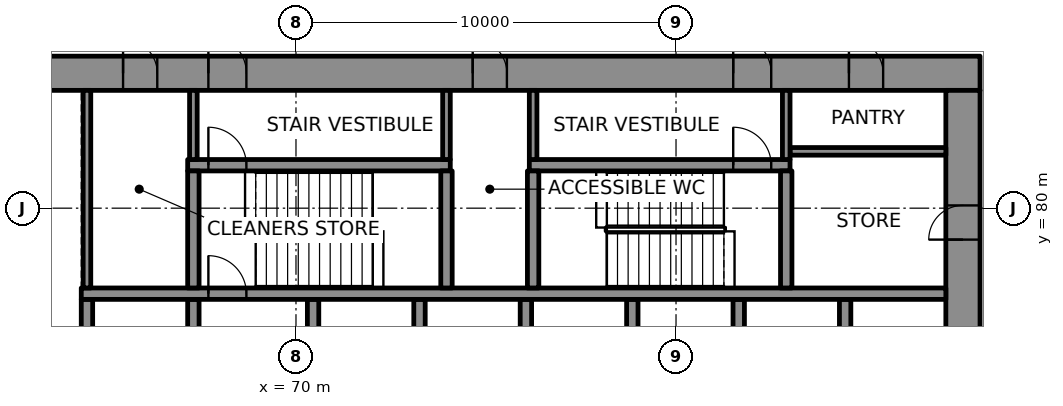
"""IFC4 building model, lengths in metres.
Left out: names, types, materials, properties, quantities, classifications, styles, units other than length and angle.
Written with IfcOpenShell. Run it as: python <this file> out.ifc"""

import sys

from ifc_helpers import new_model, si_unit, direction, frame, frame_2d, origin, place, context, subcontext, project, spatial, rectangle, extrude, element, fill, save


model = new_model("IFC4")
c1 = context("Model", 3, precision=1e-05, world=origin(), true_north=direction((0.0, 1.0)))
c2 = subcontext(c1, "Body", "Model", "MODEL_VIEW")
j1 = project(units=[si_unit("LENGTHUNIT", "METRE"), si_unit("PLANEANGLEUNIT", "RADIAN")], contexts=[c1])
p1 = place(None, origin())
s1 = spatial("IfcSite", under=j1, at=p1, CompositionType="ELEMENT")
p2 = place(p1, origin())
s2 = spatial("IfcBuilding", under=s1, at=p2, CompositionType="ELEMENT")
p3 = place(p2, frame((0.0, 0.0, 56.8)))
s3 = spatial("IfcBuildingStorey", under=s2, at=p3, CompositionType="ELEMENT", Elevation=56.8)
p4 = place(p3, frame((62.0, 83.55, 0.0), z_axis=(0.0, 0.0, 1.0), x_axis=(1.0, 0.0, 0.0)))
e1 = element("IfcWall", 1, at=p4, inside=s3, PredefinedType="SHEAR", context=c2, shape_type="SweptSolid", body=[
    extrude(rectangle(XDim=26.0, YDim=0.9, at=frame_2d((13.0, 0.0))), origin(), (0.0, 0.0, 1.0), 4.0),
])
p5 = place(p4, frame((5.695, 0.0, 0.0)))
e2 = element("IfcOpeningElement", 2, at=p5, cuts=e1, PredefinedType="OPENING", context=c2, shape_type="SweptSolid", body=[
    extrude(rectangle(XDim=1.0, YDim=2.1, at=frame_2d((0.5, 1.05))), frame((0.0, 0.46, 0.0), z_axis=(0.0, -1.0, 0.0), x_axis=(1.0, 0.0, 0.0)), (0.0, 0.0, 1.0), 0.92),
])
p6 = place(p4, frame((19.505, 0.0, 0.0)))
e3 = element("IfcOpeningElement", 3, at=p6, cuts=e1, PredefinedType="OPENING", context=c2, shape_type="SweptSolid", body=[
    extrude(rectangle(XDim=1.0, YDim=2.1, at=frame_2d((0.5, 1.05))), frame((0.0, 0.46, 0.0), z_axis=(0.0, -1.0, 0.0), x_axis=(1.0, 0.0, 0.0)), (0.0, 0.0, 1.0), 0.92),
])
p7 = place(p4, frame((3.45, 0.0, 0.0)))
e4 = element("IfcOpeningElement", 4, at=p7, cuts=e1, PredefinedType="OPENING", context=c2, shape_type="SweptSolid", body=[
    extrude(rectangle(XDim=0.9, YDim=2.1, at=frame_2d((0.45, 1.05))), frame((0.0, 0.46, 0.0), z_axis=(0.0, -1.0, 0.0), x_axis=(1.0, 0.0, 0.0)), (0.0, 0.0, 1.0), 0.92),
])
p8 = place(p4, frame((12.65, 0.0, 0.0)))
e5 = element("IfcOpeningElement", 5, at=p8, cuts=e1, PredefinedType="OPENING", context=c2, shape_type="SweptSolid", body=[
    extrude(rectangle(XDim=0.9, YDim=2.1, at=frame_2d((0.45, 1.05))), frame((0.0, 0.46, 0.0), z_axis=(0.0, -1.0, 0.0), x_axis=(1.0, 0.0, 0.0)), (0.0, 0.0, 1.0), 0.92),
])
p9 = place(p4, frame((22.55, 0.0, 0.0)))
e6 = element("IfcOpeningElement", 6, at=p9, cuts=e1, PredefinedType="OPENING", context=c2, shape_type="SweptSolid", body=[
    extrude(rectangle(XDim=0.9, YDim=2.1, at=frame_2d((0.45, 1.05))), frame((0.0, 0.46, 0.0), z_axis=(0.0, -1.0, 0.0), x_axis=(1.0, 0.0, 0.0)), (0.0, 0.0, 1.0), 0.92),
])
p10 = place(p3, frame((87.55, 66.9, 0.0), z_axis=(0.0, 0.0, 1.0), x_axis=(0.0, 1.0, 0.0)))
e7 = element("IfcWall", 7, at=p10, inside=s3, PredefinedType="SHEAR", context=c2, shape_type="SweptSolid", body=[
    extrude(rectangle(XDim=16.2, YDim=0.9, at=frame_2d((8.1, 0.0))), origin(), (0.0, 0.0, 1.0), 4.0),
])
p11 = place(p10, frame((5.5, 0.0, 0.0)))
e8 = element("IfcOpeningElement", 8, at=p11, cuts=e7, PredefinedType="OPENING", context=c2, shape_type="SweptSolid", body=[
    extrude(rectangle(XDim=1.8, YDim=2.1, at=frame_2d((0.9, 1.05))), frame((0.0, 0.46, 0.0), z_axis=(0.0, -1.0, 0.0), x_axis=(1.0, 0.0, 0.0)), (0.0, 0.0, 1.0), 0.92),
])
p12 = place(p10, frame((12.272, 0.0, 0.0)))
e9 = element("IfcOpeningElement", 9, at=p12, cuts=e7, PredefinedType="OPENING", context=c2, shape_type="SweptSolid", body=[
    extrude(rectangle(XDim=0.9, YDim=2.1, at=frame_2d((0.45, 1.05))), frame((0.0, 0.46, 0.0), z_axis=(0.0, -1.0, 0.0), x_axis=(1.0, 0.0, 0.0)), (0.0, 0.0, 1.0), 0.92),
])
for number, where, z_axis, x_axis in (
    (10, (64.5, 75.0, 0.0), (0.0, 0.0, 1.0), (0.0, 1.0, 0.0)),
    (11, (67.3, 75.0, 0.0), (0.0, 0.0, 1.0), (0.0, 1.0, 0.0)),
):
    element("IfcWall", number, at=place(p3, frame(where, z_axis=z_axis, x_axis=x_axis)), inside=s3, PredefinedType="SHEAR", context=c2, shape_type="SweptSolid", body=[
        extrude(rectangle(XDim=2.6, YDim=0.3, at=frame_2d((1.3, 0.0))), origin(), (0.0, 0.0, 1.0), 4.0),
    ])
p13 = place(p3, frame((70.45, 75.0, 0.0), z_axis=(0.0, 0.0, 1.0), x_axis=(0.0, 1.0, 0.0)))
e12 = element("IfcWall", 12, at=p13, inside=s3, PredefinedType="SHEAR", context=c2, shape_type="SweptSolid", body=[
    extrude(rectangle(XDim=2.6, YDim=0.3, at=frame_2d((1.3, 0.0))), origin(), (0.0, 0.0, 1.0), 4.0),
])
p14 = place(p13, frame((0.15, 0.0, 0.0)))
e13 = element("IfcOpeningElement", 13, at=p14, cuts=e12, PredefinedType="OPENING", context=c2, shape_type="SweptSolid", body=[
    extrude(rectangle(XDim=1.1, YDim=2.1, at=frame_2d((0.55, 1.05))), frame((0.0, 0.16, 0.0), z_axis=(0.0, -1.0, 0.0), x_axis=(1.0, 0.0, 0.0)), (0.0, 0.0, 1.0), 0.32),
])
for number, where, z_axis, x_axis in (
    (14, (73.25, 75.0, 0.0), (0.0, 0.0, 1.0), (0.0, 1.0, 0.0)),
    (15, (76.05, 75.0, 0.0), (0.0, 0.0, 1.0), (0.0, 1.0, 0.0)),
    (16, (78.85, 75.0, 0.0), (0.0, 0.0, 1.0), (0.0, 1.0, 0.0)),
    (17, (81.65, 75.0, 0.0), (0.0, 0.0, 1.0), (0.0, 1.0, 0.0)),
    (18, (84.45, 75.0, 0.0), (0.0, 0.0, 1.0), (0.0, 1.0, 0.0)),
):
    element("IfcWall", number, at=place(p3, frame(where, z_axis=z_axis, x_axis=x_axis)), inside=s3, PredefinedType="SHEAR", context=c2, shape_type="SweptSolid", body=[
        extrude(rectangle(XDim=2.6, YDim=0.3, at=frame_2d((1.3, 0.0))), origin(), (0.0, 0.0, 1.0), 4.0),
    ])
p15 = place(p3, frame((64.35, 77.75, 0.0), z_axis=(0.0, 0.0, 1.0), x_axis=(1.0, 0.0, 0.0)))
e19 = element("IfcWall", 19, at=p15, inside=s3, PredefinedType="SHEAR", context=c2, shape_type="SweptSolid", body=[
    extrude(rectangle(XDim=22.75, YDim=0.3, at=frame_2d((11.375, 0.0))), origin(), (0.0, 0.0, 1.0), 4.0),
])
p16 = place(p15, frame((3.345, 0.0, 0.0)))
e20 = element("IfcOpeningElement", 20, at=p16, cuts=e19, PredefinedType="OPENING", context=c2, shape_type="SweptSolid", body=[
    extrude(rectangle(XDim=1.0, YDim=2.1, at=frame_2d((0.5, 1.05))), frame((0.0, 0.16, 0.0), z_axis=(0.0, -1.0, 0.0), x_axis=(1.0, 0.0, 0.0)), (0.0, 0.0, 1.0), 0.32),
])
p17 = place(p3, frame((67.15, 81.13, 0.0), z_axis=(0.0, 0.0, 1.0), x_axis=(1.0, 0.0, 0.0)))
e21 = element("IfcWall", 21, at=p17, inside=s3, PredefinedType="SHEAR", context=c2, shape_type="SweptSolid", body=[
    extrude(rectangle(XDim=6.91, YDim=0.3, at=frame_2d((3.455, 0.0))), origin(), (0.0, 0.0, 1.0), 4.0),
])
p18 = place(p17, frame((0.545, 0.0, 0.0)))
e22 = element("IfcOpeningElement", 22, at=p18, cuts=e21, PredefinedType="OPENING", context=c2, shape_type="SweptSolid", body=[
    extrude(rectangle(XDim=1.0, YDim=2.1, at=frame_2d((0.5, 1.05))), frame((0.0, 0.16, 0.0), z_axis=(0.0, -1.0, 0.0), x_axis=(1.0, 0.0, 0.0)), (0.0, 0.0, 1.0), 0.32),
])
p19 = place(p3, frame((76.14, 81.13, 0.0), z_axis=(0.0, 0.0, 1.0), x_axis=(1.0, 0.0, 0.0)))
e23 = element("IfcWall", 23, at=p19, inside=s3, PredefinedType="SHEAR", context=c2, shape_type="SweptSolid", body=[
    extrude(rectangle(XDim=6.86, YDim=0.3, at=frame_2d((3.43, 0.0))), origin(), (0.0, 0.0, 1.0), 4.0),
])
p20 = place(p19, frame((5.365, 0.0, 0.0)))
e24 = element("IfcOpeningElement", 24, at=p20, cuts=e23, PredefinedType="OPENING", context=c2, shape_type="SweptSolid", body=[
    extrude(rectangle(XDim=1.0, YDim=2.1, at=frame_2d((0.5, 1.05))), frame((0.0, 0.16, 0.0), z_axis=(0.0, -1.0, 0.0), x_axis=(1.0, 0.0, 0.0)), (0.0, 0.0, 1.0), 0.32),
])
for number, where, z_axis, x_axis in (
    (25, (67.3, 77.9, 0.0), (0.0, 0.0, 1.0), (0.0, 1.0, 0.0)),
    (26, (73.96, 77.9, 0.0), (0.0, 0.0, 1.0), (0.0, 1.0, 0.0)),
    (27, (76.24, 77.9, 0.0), (0.0, 0.0, 1.0), (0.0, 1.0, 0.0)),
    (28, (82.9, 77.9, 0.0), (0.0, 0.0, 1.0), (0.0, 1.0, 0.0)),
):
    element("IfcWall", number, at=place(p3, frame(where, z_axis=z_axis, x_axis=x_axis)), inside=s3, PredefinedType="SHEAR", context=c2, shape_type="SweptSolid", body=[
        extrude(rectangle(XDim=3.08, YDim=0.3, at=frame_2d((1.54, 0.0))), origin(), (0.0, 0.0, 1.0), 4.0),
    ])
p21 = place(p3, frame((83.0, 81.495, 0.0), z_axis=(0.0, 0.0, 1.0), x_axis=(1.0, 0.0, 0.0)))
e29 = element("IfcWall", 29, at=p21, inside=s3, PredefinedType="PARTITIONING", context=c2, shape_type="SweptSolid", body=[
    extrude(rectangle(XDim=4.1, YDim=0.2, at=frame_2d((2.05, 0.0))), origin(), (0.0, 0.0, 1.0), 4.0),
])
p22 = place(p3, frame((64.5, 77.9, 0.0), z_axis=(0.0, 0.0, 1.0), x_axis=(0.0, 1.0, 0.0)))
e30 = element("IfcWall", 30, at=p22, inside=s3, PredefinedType="PARTITIONING", context=c2, shape_type="SweptSolid", body=[
    extrude(rectangle(XDim=5.2, YDim=0.2, at=frame_2d((2.6, 0.0))), origin(), (0.0, 0.0, 1.0), 4.0),
])
for number, where, z_axis, x_axis in (
    (31, (67.3, 81.28, 0.0), (0.0, 0.0, 1.0), (0.0, 1.0, 0.0)),
    (32, (73.96, 81.28, 0.0), (0.0, 0.0, 1.0), (0.0, 1.0, 0.0)),
    (33, (76.24, 81.28, 0.0), (0.0, 0.0, 1.0), (0.0, 1.0, 0.0)),
    (34, (82.9, 81.28, 0.0), (0.0, 0.0, 1.0), (0.0, 1.0, 0.0)),
):
    element("IfcWall", number, at=place(p3, frame(where, z_axis=z_axis, x_axis=x_axis)), inside=s3, PredefinedType="PARTITIONING", context=c2, shape_type="SweptSolid", body=[
        extrude(rectangle(XDim=1.82, YDim=0.2, at=frame_2d((0.91, 0.0))), origin(), (0.0, 0.0, 1.0), 4.0),
    ])
p23 = place(p16, origin())
e35 = element("IfcDoor", 35, at=p23, inside=s3, OperationType="SINGLE_SWING_LEFT", PredefinedType="DOOR", context=c2, shape_type="SweptSolid", body=[
    extrude(rectangle(XDim=1.0, YDim=2.1, at=frame_2d((0.5, 1.05))), frame((0.0, 0.025, 0.0), z_axis=(0.0, -1.0, 0.0), x_axis=(1.0, 0.0, 0.0)), (0.0, 0.0, 1.0), 0.05),
])
fill(e20, e35)
p24 = place(p18, origin())
e36 = element("IfcDoor", 36, at=p24, inside=s3, OperationType="SINGLE_SWING_RIGHT", PredefinedType="DOOR", context=c2, shape_type="SweptSolid", body=[
    extrude(rectangle(XDim=1.0, YDim=2.1, at=frame_2d((0.5, 1.05))), frame((0.0, 0.025, 0.0), z_axis=(0.0, -1.0, 0.0), x_axis=(1.0, 0.0, 0.0)), (0.0, 0.0, 1.0), 0.05),
])
fill(e22, e36)
p25 = place(p5, origin())
e37 = element("IfcDoor", 37, at=p25, inside=s3, OperationType="SINGLE_SWING_LEFT", PredefinedType="DOOR", context=c2, shape_type="SweptSolid", body=[
    extrude(rectangle(XDim=1.0, YDim=2.1, at=frame_2d((0.5, 1.05))), frame((0.0, 0.17, 0.0), z_axis=(0.0, -1.0, 0.0), x_axis=(1.0, 0.0, 0.0)), (0.0, 0.0, 1.0), 0.34),
])
fill(e2, e37)
p26 = place(p20, origin())
e38 = element("IfcDoor", 38, at=p26, inside=s3, OperationType="SINGLE_SWING_RIGHT", PredefinedType="DOOR", context=c2, shape_type="SweptSolid", body=[
    extrude(rectangle(XDim=1.0, YDim=2.1, at=frame_2d((0.5, 1.05))), frame((0.0, 0.025, 0.0), z_axis=(0.0, -1.0, 0.0), x_axis=(1.0, 0.0, 0.0)), (0.0, 0.0, 1.0), 0.05),
])
fill(e24, e38)
p27 = place(p6, origin())
e39 = element("IfcDoor", 39, at=p27, inside=s3, OperationType="SINGLE_SWING_LEFT", PredefinedType="DOOR", context=c2, shape_type="SweptSolid", body=[
    extrude(rectangle(XDim=1.0, YDim=2.1, at=frame_2d((0.5, 1.05))), frame((0.0, 0.17, 0.0), z_axis=(0.0, -1.0, 0.0), x_axis=(1.0, 0.0, 0.0)), (0.0, 0.0, 1.0), 0.34),
])
fill(e3, e39)
p28 = place(p7, origin())
e40 = element("IfcDoor", 40, at=p28, inside=s3, OperationType="SINGLE_SWING_RIGHT", PredefinedType="DOOR", context=c2, shape_type="SweptSolid", body=[
    extrude(rectangle(XDim=0.9, YDim=2.1, at=frame_2d((0.45, 1.05))), frame((0.0, 0.17, 0.0), z_axis=(0.0, -1.0, 0.0), x_axis=(1.0, 0.0, 0.0)), (0.0, 0.0, 1.0), 0.34),
])
fill(e4, e40)
p29 = place(p8, origin())
e41 = element("IfcDoor", 41, at=p29, inside=s3, OperationType="SINGLE_SWING_LEFT", PredefinedType="DOOR", context=c2, shape_type="SweptSolid", body=[
    extrude(rectangle(XDim=0.9, YDim=2.1, at=frame_2d((0.45, 1.05))), frame((0.0, 0.17, 0.0), z_axis=(0.0, -1.0, 0.0), x_axis=(1.0, 0.0, 0.0)), (0.0, 0.0, 1.0), 0.34),
])
fill(e5, e41)
p30 = place(p12, origin())
e42 = element("IfcDoor", 42, at=p30, inside=s3, OperationType="SINGLE_SWING_RIGHT", PredefinedType="DOOR", context=c2, shape_type="SweptSolid", body=[
    extrude(rectangle(XDim=0.9, YDim=2.1, at=frame_2d((0.45, 1.05))), frame((0.0, 0.17, 0.0), z_axis=(0.0, -1.0, 0.0), x_axis=(1.0, 0.0, 0.0)), (0.0, 0.0, 1.0), 0.34),
])
fill(e9, e42)
p31 = place(p9, origin())
e43 = element("IfcDoor", 43, at=p31, inside=s3, OperationType="SINGLE_SWING_LEFT", PredefinedType="DOOR", context=c2, shape_type="SweptSolid", body=[
    extrude(rectangle(XDim=0.9, YDim=2.1, at=frame_2d((0.45, 1.05))), frame((0.0, 0.17, 0.0), z_axis=(0.0, -1.0, 0.0), x_axis=(1.0, 0.0, 0.0)), (0.0, 0.0, 1.0), 0.34),
])
fill(e6, e43)
save(model, sys.argv[1])
